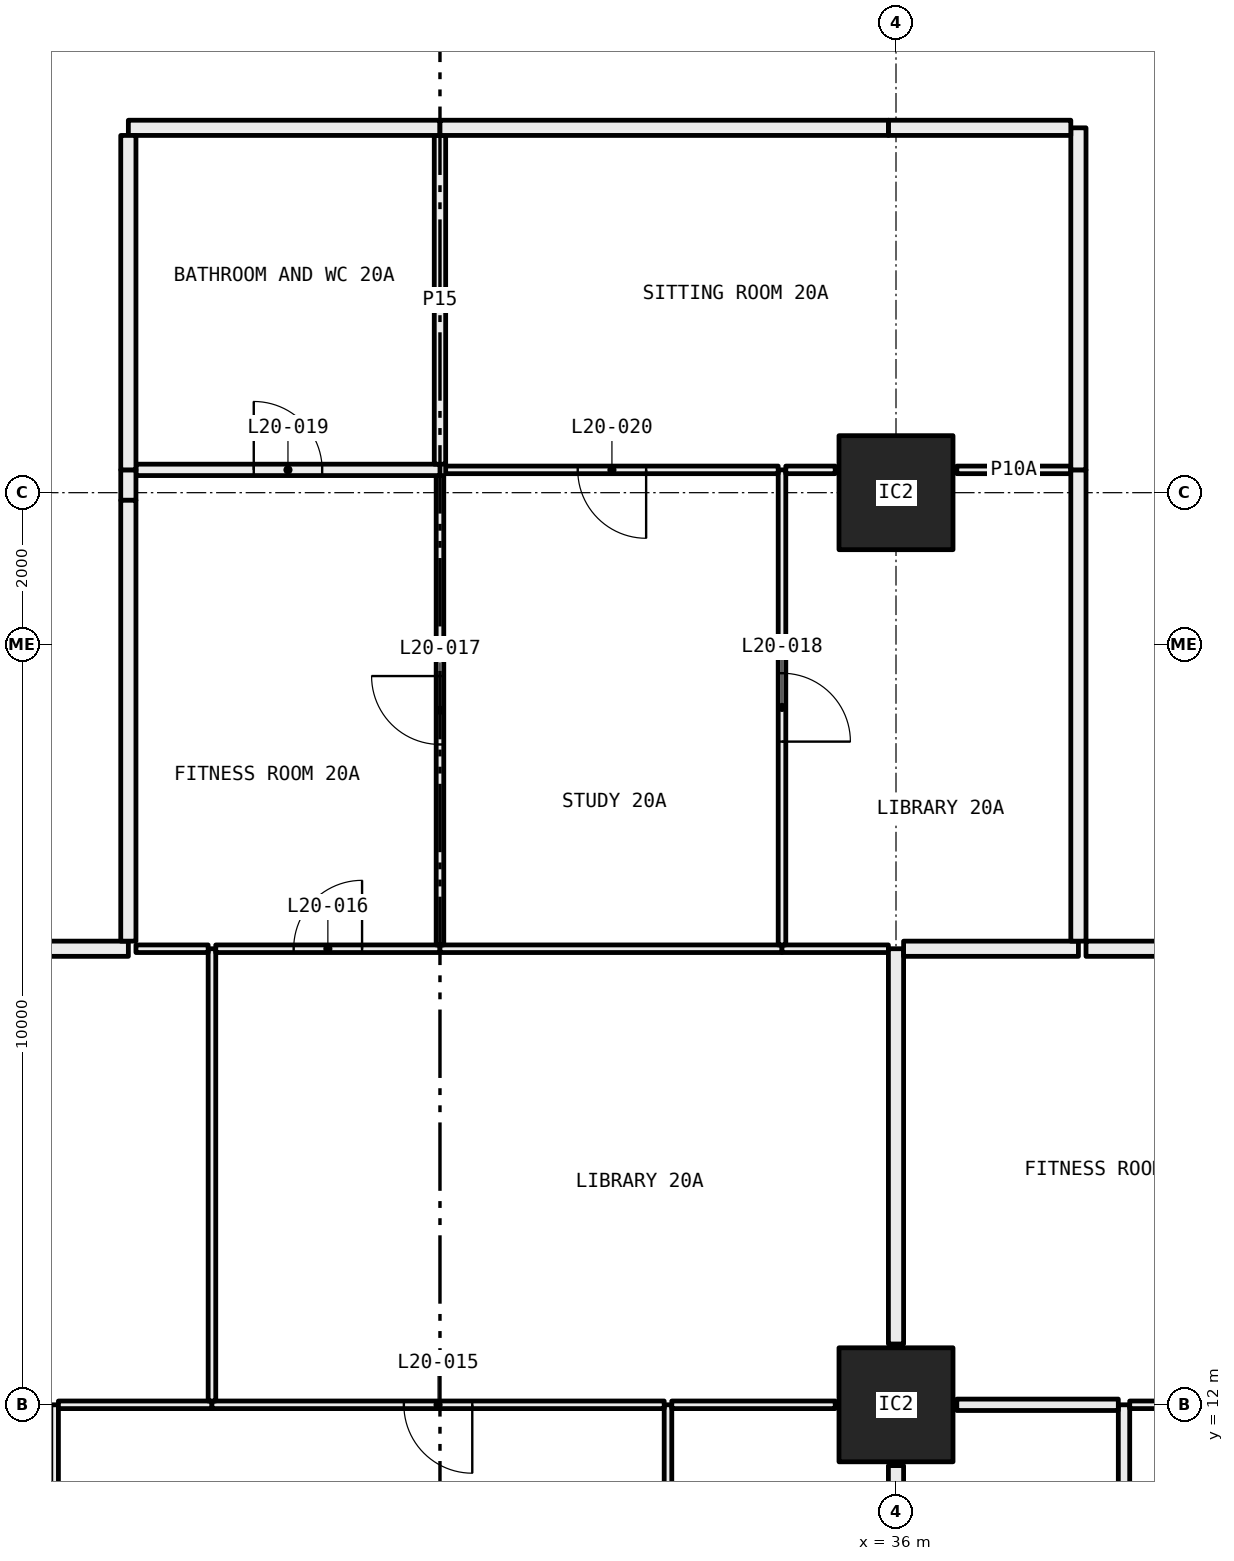
"""IFC4 building model, lengths in metres.
Left out: names, types, materials, properties, quantities, classifications, styles, units other than length and angle.
Written with IfcOpenShell. Run it as: python <this file> out.ifc"""

import sys

from ifc_helpers import new_model, si_unit, direction, frame, frame_2d, origin, origin_2d, place, context, subcontext, project, spatial, rectangle, hollow_rectangle, extrude, element, fill, save


model = new_model("IFC4")
c1 = context("Model", 3, precision=1e-05, world=origin(), true_north=direction((0.0, 1.0)))
c2 = subcontext(c1, "Body", "Model", "MODEL_VIEW")
j1 = project(units=[si_unit("LENGTHUNIT", "METRE"), si_unit("PLANEANGLEUNIT", "RADIAN")], contexts=[c1])
p1 = place(None, origin())
s1 = spatial("IfcSite", under=j1, at=p1, CompositionType="ELEMENT")
p2 = place(p1, origin())
s2 = spatial("IfcBuilding", under=s1, at=p2, CompositionType="ELEMENT")
p3 = place(p2, frame((0.0, 0.0, 81.75)))
s3 = spatial("IfcBuildingStorey", under=s2, at=p3, CompositionType="ELEMENT", Elevation=81.75)
for number, where, z_axis, x_axis in (
    (1, (36.0, 12.0, 0.0), (0.0, 0.0, 1.0), (1.0, 0.0, 0.0)),
    (2, (36.0, 24.0, 0.0), (0.0, 0.0, 1.0), (1.0, 0.0, 0.0)),
):
    element("IfcColumn", number, at=place(p3, frame(where, z_axis=z_axis, x_axis=x_axis)), inside=s3, PredefinedType="COLUMN", context=c2, shape_type="SweptSolid", body=[
        extrude(hollow_rectangle(XDim=1.5, YDim=1.5, WallThickness=0.065, at=origin_2d()), origin(), (0.0, 0.0, 1.0), 3.05),
    ])
p4 = place(p3, frame((24.93, 6.05, 0.0), z_axis=(0.0, 0.0, 1.0), x_axis=(0.0, 1.0, 0.0)))
e3 = element("IfcWall", 3, at=p4, inside=s3, PredefinedType="PARTITIONING", context=c2, shape_type="SweptSolid", body=[
    extrude(rectangle(XDim=5.95, YDim=0.1, at=frame_2d((2.975, 0.0))), origin(), (0.0, 0.0, 1.0), 2.45),
])
p5 = place(p4, frame((2.525, 0.0, 0.0)))
e4 = element("IfcOpeningElement", 4, at=p5, cuts=e3, PredefinedType="OPENING", context=c2, shape_type="SweptSolid", body=[
    extrude(rectangle(XDim=0.9, YDim=2.1, at=frame_2d((0.45, 1.05))), frame((0.0, 0.06, 0.0), z_axis=(0.0, -1.0, 0.0), x_axis=(1.0, 0.0, 0.0)), (0.0, 0.0, 1.0), 0.12),
])
p6 = place(p3, frame((33.0, 6.05, 0.0), z_axis=(0.0, 0.0, 1.0), x_axis=(0.0, 1.0, 0.0)))
e5 = element("IfcWall", 5, at=p6, inside=s3, PredefinedType="PARTITIONING", context=c2, shape_type="SweptSolid", body=[
    extrude(rectangle(XDim=5.95, YDim=0.1, at=frame_2d((2.975, 0.0))), origin(), (0.0, 0.0, 1.0), 2.45),
])
p7 = place(p6, frame((2.525, 0.0, 0.0)))
e6 = element("IfcOpeningElement", 6, at=p7, cuts=e5, PredefinedType="OPENING", context=c2, shape_type="SweptSolid", body=[
    extrude(rectangle(XDim=0.9, YDim=2.1, at=frame_2d((0.45, 1.05))), frame((0.0, 0.06, 0.0), z_axis=(0.0, -1.0, 0.0), x_axis=(1.0, 0.0, 0.0)), (0.0, 0.0, 1.0), 0.12),
])
p8 = place(p3, frame((27.0, 12.0, 0.0), z_axis=(0.0, 0.0, 1.0), x_axis=(-1.0, 0.0, 0.0)))
e7 = element("IfcWall", 7, at=p8, inside=s3, PredefinedType="PARTITIONING", context=c2, shape_type="SweptSolid", body=[
    extrude(rectangle(XDim=2.02, YDim=0.1, at=frame_2d((1.01, 0.0))), origin(), (0.0, 0.0, 1.0), 2.45),
])
p9 = place(p3, frame((32.95, 12.0, 0.0), z_axis=(0.0, 0.0, 1.0), x_axis=(-1.0, 0.0, 0.0)))
e8 = element("IfcWall", 8, at=p9, inside=s3, PredefinedType="PARTITIONING", context=c2, shape_type="SweptSolid", body=[
    extrude(rectangle(XDim=5.95, YDim=0.1, at=frame_2d((2.975, 0.0))), origin(), (0.0, 0.0, 1.0), 2.45),
])
p10 = place(p9, frame((2.525, 0.0, 0.0)))
e9 = element("IfcOpeningElement", 9, at=p10, cuts=e8, PredefinedType="OPENING", context=c2, shape_type="SweptSolid", body=[
    extrude(rectangle(XDim=0.9, YDim=2.1, at=frame_2d((0.45, 1.05))), frame((0.0, 0.06, 0.0), z_axis=(0.0, -1.0, 0.0), x_axis=(1.0, 0.0, 0.0)), (0.0, 0.0, 1.0), 0.12),
])
p11 = place(p3, frame((35.2, 12.0, 0.0), z_axis=(0.0, 0.0, 1.0), x_axis=(-1.0, 0.0, 0.0)))
e10 = element("IfcWall", 10, at=p11, inside=s3, PredefinedType="PARTITIONING", context=c2, shape_type="SweptSolid", body=[
    extrude(rectangle(XDim=2.15, YDim=0.1, at=frame_2d((1.075, 0.0))), origin(), (0.0, 0.0, 1.0), 2.45),
])
p12 = place(p3, frame((36.0, 6.0, 0.0), z_axis=(0.0, 0.0, 1.0), x_axis=(0.0, 1.0, 0.0)))
e11 = element("IfcWall", 11, at=p12, inside=s3, PredefinedType="PARTITIONING", context=c2, shape_type="SweptSolid", body=[
    extrude(rectangle(XDim=5.2, YDim=0.2, at=frame_2d((2.6, 0.0))), origin(), (0.0, 0.0, 1.0), 2.45),
])
p13 = place(p3, frame((27.0, 12.05, 0.0), z_axis=(0.0, 0.0, 1.0), x_axis=(0.0, 1.0, 0.0)))
e12 = element("IfcWall", 12, at=p13, inside=s3, PredefinedType="PARTITIONING", context=c2, shape_type="SweptSolid", body=[
    extrude(rectangle(XDim=5.95, YDim=0.1, at=frame_2d((2.975, 0.0))), origin(), (0.0, 0.0, 1.0), 2.45),
])
p14 = place(p3, frame((26.95, 18.0, 0.0), z_axis=(0.0, 0.0, 1.0), x_axis=(-1.0, 0.0, 0.0)))
e13 = element("IfcWall", 13, at=p14, inside=s3, PredefinedType="PARTITIONING", context=c2, shape_type="SweptSolid", body=[
    extrude(rectangle(XDim=0.95, YDim=0.1, at=frame_2d((0.475, 0.0))), origin(), (0.0, 0.0, 1.0), 3.05),
])
p15 = place(p3, frame((25.9, 18.0, 0.0), z_axis=(0.0, 0.0, 1.0), x_axis=(-1.0, 0.0, 0.0)))
e14 = element("IfcWall", 14, at=p15, inside=s3, PredefinedType="PARTITIONING", context=c2, shape_type="SweptSolid", body=[
    extrude(rectangle(XDim=6.4, YDim=0.2, at=frame_2d((3.2, 0.0))), origin(), (0.0, 0.0, 1.0), 3.05),
])
p16 = place(p3, frame((30.0, 18.0, 0.0), z_axis=(0.0, 0.0, 1.0), x_axis=(-1.0, 0.0, 0.0)))
e15 = element("IfcWall", 15, at=p16, inside=s3, PredefinedType="PARTITIONING", context=c2, shape_type="SweptSolid", body=[
    extrude(rectangle(XDim=2.95, YDim=0.1, at=frame_2d((1.475, 0.0))), origin(), (0.0, 0.0, 1.0), 3.05),
])
p17 = place(p16, frame((1.025, 0.0, 0.0)))
e16 = element("IfcOpeningElement", 16, at=p17, cuts=e15, PredefinedType="OPENING", context=c2, shape_type="SweptSolid", body=[
    extrude(rectangle(XDim=0.9, YDim=2.1, at=frame_2d((0.45, 1.05))), frame((0.0, 0.06, 0.0), z_axis=(0.0, -1.0, 0.0), x_axis=(1.0, 0.0, 0.0)), (0.0, 0.0, 1.0), 0.12),
])
p18 = place(p3, frame((34.5, 18.0, 0.0), z_axis=(0.0, 0.0, 1.0), x_axis=(-1.0, 0.0, 0.0)))
e17 = element("IfcWall", 17, at=p18, inside=s3, PredefinedType="PARTITIONING", context=c2, shape_type="SweptSolid", body=[
    extrude(rectangle(XDim=4.5, YDim=0.1, at=frame_2d((2.25, 0.0))), origin(), (0.0, 0.0, 1.0), 3.05),
])
p19 = place(p3, frame((35.9, 18.0, 0.0), z_axis=(0.0, 0.0, 1.0), x_axis=(-1.0, 0.0, 0.0)))
e18 = element("IfcWall", 18, at=p19, inside=s3, PredefinedType="PARTITIONING", context=c2, shape_type="SweptSolid", body=[
    extrude(rectangle(XDim=1.4, YDim=0.1, at=frame_2d((0.7, 0.0))), origin(), (0.0, 0.0, 1.0), 3.05),
])
p20 = place(p3, frame((36.0, 12.8, 0.0), z_axis=(0.0, 0.0, 1.0), x_axis=(0.0, 1.0, 0.0)))
e19 = element("IfcWall", 19, at=p20, inside=s3, PredefinedType="PARTITIONING", context=c2, shape_type="SweptSolid", body=[
    extrude(rectangle(XDim=5.2, YDim=0.2, at=frame_2d((2.6, 0.0))), origin(), (0.0, 0.0, 1.0), 2.45),
])
p21 = place(p3, frame((30.0, 18.05, 0.0), z_axis=(0.0, 0.0, 1.0), x_axis=(0.0, 1.0, 0.0)))
e20 = element("IfcWall", 20, at=p21, inside=s3, PredefinedType="PARTITIONING", context=c2, shape_type="SweptSolid", body=[
    extrude(rectangle(XDim=6.175, YDim=0.1, at=frame_2d((3.087, 0.0))), origin(), (0.0, 0.0, 1.0), 2.45),
])
p22 = place(p21, frame((2.637, 0.0, 0.0)))
e21 = element("IfcOpeningElement", 21, at=p22, cuts=e20, PredefinedType="OPENING", context=c2, shape_type="SweptSolid", body=[
    extrude(rectangle(XDim=0.9, YDim=2.1, at=frame_2d((0.45, 1.05))), frame((0.0, 0.06, 0.0), z_axis=(0.0, -1.0, 0.0), x_axis=(1.0, 0.0, 0.0)), (0.0, 0.0, 1.0), 0.12),
])
p23 = place(p3, frame((30.0, 24.3, 0.0), z_axis=(0.0, 0.0, 1.0), x_axis=(-1.0, 0.0, 0.0)))
e22 = element("IfcWall", 22, at=p23, inside=s3, PredefinedType="PARTITIONING", context=c2, shape_type="SweptSolid", body=[
    extrude(rectangle(XDim=4.0, YDim=0.15, at=frame_2d((2.0, 0.0))), origin(), (0.0, 0.0, 1.0), 3.05),
])
p24 = place(p23, frame((1.55, 0.0, 0.0)))
e23 = element("IfcOpeningElement", 23, at=p24, cuts=e22, PredefinedType="OPENING", context=c2, shape_type="SweptSolid", body=[
    extrude(rectangle(XDim=0.9, YDim=2.1, at=frame_2d((0.45, 1.05))), frame((0.0, 0.085, 0.0), z_axis=(0.0, -1.0, 0.0), x_axis=(1.0, 0.0, 0.0)), (0.0, 0.0, 1.0), 0.17),
])
p25 = place(p3, frame((25.9, 24.3, 0.0), z_axis=(0.0, 0.0, 1.0), x_axis=(0.0, -1.0, 0.0)))
e24 = element("IfcWall", 24, at=p25, inside=s3, PredefinedType="PARTITIONING", context=c2, shape_type="SweptSolid", body=[
    extrude(rectangle(XDim=0.4, YDim=0.2, at=frame_2d((0.2, 0.0))), origin(), (0.0, 0.0, 1.0), 2.45),
])
p26 = place(p3, frame((25.9, 23.9, 0.0), z_axis=(0.0, 0.0, 1.0), x_axis=(0.0, -1.0, 0.0)))
e25 = element("IfcWall", 25, at=p26, inside=s3, PredefinedType="PARTITIONING", context=c2, shape_type="SweptSolid", body=[
    extrude(rectangle(XDim=5.8, YDim=0.2, at=frame_2d((2.9, 0.0))), origin(), (0.0, 0.0, 1.0), 3.05),
])
p27 = place(p3, frame((34.5, 18.05, 0.0), z_axis=(0.0, 0.0, 1.0), x_axis=(0.0, 1.0, 0.0)))
e26 = element("IfcWall", 26, at=p27, inside=s3, PredefinedType="PARTITIONING", context=c2, shape_type="SweptSolid", body=[
    extrude(rectangle(XDim=6.25, YDim=0.1, at=frame_2d((3.125, 0.0))), origin(), (0.0, 0.0, 1.0), 2.45),
])
p28 = place(p27, frame((2.675, 0.0, 0.0)))
e27 = element("IfcOpeningElement", 27, at=p28, cuts=e26, PredefinedType="OPENING", context=c2, shape_type="SweptSolid", body=[
    extrude(rectangle(XDim=0.9, YDim=2.1, at=frame_2d((0.45, 1.05))), frame((0.0, 0.06, 0.0), z_axis=(0.0, -1.0, 0.0), x_axis=(1.0, 0.0, 0.0)), (0.0, 0.0, 1.0), 0.12),
])
p29 = place(p3, frame((34.45, 24.3, 0.0), z_axis=(0.0, 0.0, 1.0), x_axis=(-1.0, 0.0, 0.0)))
e28 = element("IfcWall", 28, at=p29, inside=s3, PredefinedType="PARTITIONING", context=c2, shape_type="SweptSolid", body=[
    extrude(rectangle(XDim=4.375, YDim=0.1, at=frame_2d((2.188, 0.0))), origin(), (0.0, 0.0, 1.0), 3.05),
])
p30 = place(p29, frame((1.738, 0.0, 0.0)))
e29 = element("IfcOpeningElement", 29, at=p30, cuts=e28, PredefinedType="OPENING", context=c2, shape_type="SweptSolid", body=[
    extrude(rectangle(XDim=0.9, YDim=2.1, at=frame_2d((0.45, 1.05))), frame((0.0, 0.06, 0.0), z_axis=(0.0, -1.0, 0.0), x_axis=(1.0, 0.0, 0.0)), (0.0, 0.0, 1.0), 0.12),
])
p31 = place(p3, frame((35.2, 24.3, 0.0), z_axis=(0.0, 0.0, 1.0), x_axis=(-1.0, 0.0, 0.0)))
e30 = element("IfcWall", 30, at=p31, inside=s3, PredefinedType="PARTITIONING", context=c2, shape_type="SweptSolid", body=[
    extrude(rectangle(XDim=0.65, YDim=0.1, at=frame_2d((0.325, 0.0))), origin(), (0.0, 0.0, 1.0), 3.05),
])
p32 = place(p3, frame((38.3, 24.3, 0.0), z_axis=(0.0, 0.0, 1.0), x_axis=(-1.0, 0.0, 0.0)))
e31 = element("IfcWall", 31, at=p32, inside=s3, PredefinedType="PARTITIONING", context=c2, shape_type="SweptSolid", body=[
    extrude(rectangle(XDim=1.5, YDim=0.1, at=frame_2d((0.75, 0.0))), origin(), (0.0, 0.0, 1.0), 3.05),
])
p33 = place(p3, frame((36.1, 18.0, 0.0), z_axis=(0.0, 0.0, 1.0), x_axis=(1.0, 0.0, 0.0)))
e32 = element("IfcWall", 32, at=p33, inside=s3, PredefinedType="PARTITIONING", context=c2, shape_type="SweptSolid", body=[
    extrude(rectangle(XDim=2.3, YDim=0.2, at=frame_2d((1.15, 0.0))), origin(), (0.0, 0.0, 1.0), 3.05),
])
p34 = place(p3, frame((38.4, 18.1, 0.0), z_axis=(0.0, 0.0, 1.0), x_axis=(0.0, 1.0, 0.0)))
e33 = element("IfcWall", 33, at=p34, inside=s3, PredefinedType="PARTITIONING", context=c2, shape_type="SweptSolid", body=[
    extrude(rectangle(XDim=6.2, YDim=0.2, at=frame_2d((3.1, 0.0))), origin(), (0.0, 0.0, 1.0), 2.45),
])
p35 = place(p3, frame((30.0, 24.375, 0.0), z_axis=(0.0, 0.0, 1.0), x_axis=(0.0, 1.0, 0.0)))
e34 = element("IfcWall", 34, at=p35, inside=s3, PredefinedType="PARTITIONING", context=c2, shape_type="SweptSolid", body=[
    extrude(rectangle(XDim=4.325, YDim=0.15, at=frame_2d((2.163, 0.0))), origin(), (0.0, 0.0, 1.0), 3.05),
])
p36 = place(p3, frame((30.0, 28.8, 0.0), z_axis=(0.0, 0.0, 1.0), x_axis=(-1.0, 0.0, 0.0)))
e35 = element("IfcWall", 35, at=p36, inside=s3, PredefinedType="PARTITIONING", context=c2, shape_type="SweptSolid", body=[
    extrude(rectangle(XDim=4.1, YDim=0.2, at=frame_2d((2.05, 0.0))), origin(), (0.0, 0.0, 1.0), 3.05),
])
p37 = place(p3, frame((25.9, 28.7, 0.0), z_axis=(0.0, 0.0, 1.0), x_axis=(0.0, -1.0, 0.0)))
e36 = element("IfcWall", 36, at=p37, inside=s3, PredefinedType="PARTITIONING", context=c2, shape_type="SweptSolid", body=[
    extrude(rectangle(XDim=4.4, YDim=0.2, at=frame_2d((2.2, 0.0))), origin(), (0.0, 0.0, 1.0), 3.05),
])
p38 = place(p3, frame((38.4, 24.3, 0.0), z_axis=(0.0, 0.0, 1.0), x_axis=(0.0, 1.0, 0.0)))
e37 = element("IfcWall", 37, at=p38, inside=s3, PredefinedType="PARTITIONING", context=c2, shape_type="SweptSolid", body=[
    extrude(rectangle(XDim=4.5, YDim=0.2, at=frame_2d((2.25, 0.0))), origin(), (0.0, 0.0, 1.0), 3.05),
])
p39 = place(p3, frame((38.3, 28.8, 0.0), z_axis=(0.0, 0.0, 1.0), x_axis=(-1.0, 0.0, 0.0)))
e38 = element("IfcWall", 38, at=p39, inside=s3, PredefinedType="PARTITIONING", context=c2, shape_type="SweptSolid", body=[
    extrude(rectangle(XDim=2.4, YDim=0.2, at=frame_2d((1.2, 0.0))), origin(), (0.0, 0.0, 1.0), 2.45),
])
p40 = place(p3, frame((35.9, 28.8, 0.0), z_axis=(0.0, 0.0, 1.0), x_axis=(-1.0, 0.0, 0.0)))
e39 = element("IfcWall", 39, at=p40, inside=s3, PredefinedType="PARTITIONING", context=c2, shape_type="SweptSolid", body=[
    extrude(rectangle(XDim=5.9, YDim=0.2, at=frame_2d((2.95, 0.0))), origin(), (0.0, 0.0, 1.0), 3.05),
])
p41 = place(p3, frame((39.0, 6.075, 0.0), z_axis=(0.0, 0.0, 1.0), x_axis=(0.0, 1.0, 0.0)))
e40 = element("IfcWall", 40, at=p41, inside=s3, PredefinedType="PARTITIONING", context=c2, shape_type="SweptSolid", body=[
    extrude(rectangle(XDim=5.925, YDim=0.15, at=frame_2d((2.962, 0.0))), origin(), (0.0, 0.0, 1.0), 2.45),
])
p42 = place(p41, frame((2.512, 0.0, 0.0)))
e41 = element("IfcOpeningElement", 41, at=p42, cuts=e40, PredefinedType="OPENING", context=c2, shape_type="SweptSolid", body=[
    extrude(rectangle(XDim=0.9, YDim=2.1, at=frame_2d((0.45, 1.05))), frame((0.0, 0.085, 0.0), z_axis=(0.0, -1.0, 0.0), x_axis=(1.0, 0.0, 0.0)), (0.0, 0.0, 1.0), 0.17),
])
p43 = place(p3, frame((38.925, 12.0, 0.0), z_axis=(0.0, 0.0, 1.0), x_axis=(-1.0, 0.0, 0.0)))
e42 = element("IfcWall", 42, at=p43, inside=s3, PredefinedType="PARTITIONING", context=c2, shape_type="SweptSolid", body=[
    extrude(rectangle(XDim=2.125, YDim=0.15, at=frame_2d((1.062, 0.0))), origin(), (0.0, 0.0, 1.0), 2.45),
])
p44 = place(p3, frame((42.0, 12.0, 0.0), z_axis=(0.0, 0.0, 1.0), x_axis=(-1.0, 0.0, 0.0)))
e43 = element("IfcWall", 43, at=p44, inside=s3, PredefinedType="PARTITIONING", context=c2, shape_type="SweptSolid", body=[
    extrude(rectangle(XDim=2.925, YDim=0.1, at=frame_2d((1.462, 0.0))), origin(), (0.0, 0.0, 1.0), 2.45),
])
p45 = place(p44, frame((1.012, 0.0, 0.0)))
e44 = element("IfcOpeningElement", 44, at=p45, cuts=e43, PredefinedType="OPENING", context=c2, shape_type="SweptSolid", body=[
    extrude(rectangle(XDim=0.9, YDim=2.1, at=frame_2d((0.45, 1.05))), frame((0.0, 0.06, 0.0), z_axis=(0.0, -1.0, 0.0), x_axis=(1.0, 0.0, 0.0)), (0.0, 0.0, 1.0), 0.12),
])
p46 = place(p3, frame((40.8, 18.0, 0.0), z_axis=(0.0, 0.0, 1.0), x_axis=(-1.0, 0.0, 0.0)))
e45 = element("IfcWall", 45, at=p46, inside=s3, PredefinedType="PARTITIONING", context=c2, shape_type="SweptSolid", body=[
    extrude(rectangle(XDim=2.3, YDim=0.2, at=frame_2d((1.15, 0.0))), origin(), (0.0, 0.0, 1.0), 3.05),
])
p47 = place(p10, origin())
e46 = element("IfcDoor", 46, at=p47, inside=s3, OperationType="SINGLE_SWING_RIGHT", PredefinedType="DOOR", context=c2, shape_type="SweptSolid", body=[
    extrude(rectangle(XDim=0.9, YDim=2.1, at=frame_2d((0.45, 1.05))), frame((0.0, 0.025, 0.0), z_axis=(0.0, -1.0, 0.0), x_axis=(1.0, 0.0, 0.0)), (0.0, 0.0, 1.0), 0.05),
])
fill(e9, e46)
p48 = place(p17, frame((0.9, 0.0, 0.0), x_axis=(-1.0, 0.0, 0.0)))
e47 = element("IfcDoor", 47, at=p48, inside=s3, OperationType="SINGLE_SWING_LEFT", PredefinedType="DOOR", context=c2, shape_type="SweptSolid", body=[
    extrude(rectangle(XDim=0.9, YDim=2.1, at=frame_2d((0.45, 1.05))), frame((0.0, 0.025, 0.0), z_axis=(0.0, -1.0, 0.0), x_axis=(1.0, 0.0, 0.0)), (0.0, 0.0, 1.0), 0.05),
])
fill(e16, e47)
p49 = place(p22, origin())
e48 = element("IfcDoor", 48, at=p49, inside=s3, OperationType="SINGLE_SWING_LEFT", PredefinedType="DOOR", context=c2, shape_type="SweptSolid", body=[
    extrude(rectangle(XDim=0.9, YDim=2.1, at=frame_2d((0.45, 1.05))), frame((0.0, 0.025, 0.0), z_axis=(0.0, -1.0, 0.0), x_axis=(1.0, 0.0, 0.0)), (0.0, 0.0, 1.0), 0.05),
])
fill(e21, e48)
p50 = place(p28, frame((0.9, 0.0, 0.0), x_axis=(-1.0, 0.0, 0.0)))
e49 = element("IfcDoor", 49, at=p50, inside=s3, OperationType="SINGLE_SWING_LEFT", PredefinedType="DOOR", context=c2, shape_type="SweptSolid", body=[
    extrude(rectangle(XDim=0.9, YDim=2.1, at=frame_2d((0.45, 1.05))), frame((0.0, 0.025, 0.0), z_axis=(0.0, -1.0, 0.0), x_axis=(1.0, 0.0, 0.0)), (0.0, 0.0, 1.0), 0.05),
])
fill(e27, e49)
p51 = place(p24, frame((0.9, 0.0, 0.0), x_axis=(-1.0, 0.0, 0.0)))
e50 = element("IfcDoor", 50, at=p51, inside=s3, OperationType="SINGLE_SWING_RIGHT", PredefinedType="DOOR", context=c2, shape_type="SweptSolid", body=[
    extrude(rectangle(XDim=0.9, YDim=2.1, at=frame_2d((0.45, 1.05))), frame((0.0, 0.025, 0.0), z_axis=(0.0, -1.0, 0.0), x_axis=(1.0, 0.0, 0.0)), (0.0, 0.0, 1.0), 0.05),
])
fill(e23, e50)
p52 = place(p30, origin())
e51 = element("IfcDoor", 51, at=p52, inside=s3, OperationType="SINGLE_SWING_RIGHT", PredefinedType="DOOR", context=c2, shape_type="SweptSolid", body=[
    extrude(rectangle(XDim=0.9, YDim=2.1, at=frame_2d((0.45, 1.05))), frame((0.0, 0.025, 0.0), z_axis=(0.0, -1.0, 0.0), x_axis=(1.0, 0.0, 0.0)), (0.0, 0.0, 1.0), 0.05),
])
fill(e29, e51)
save(model, sys.argv[1])
